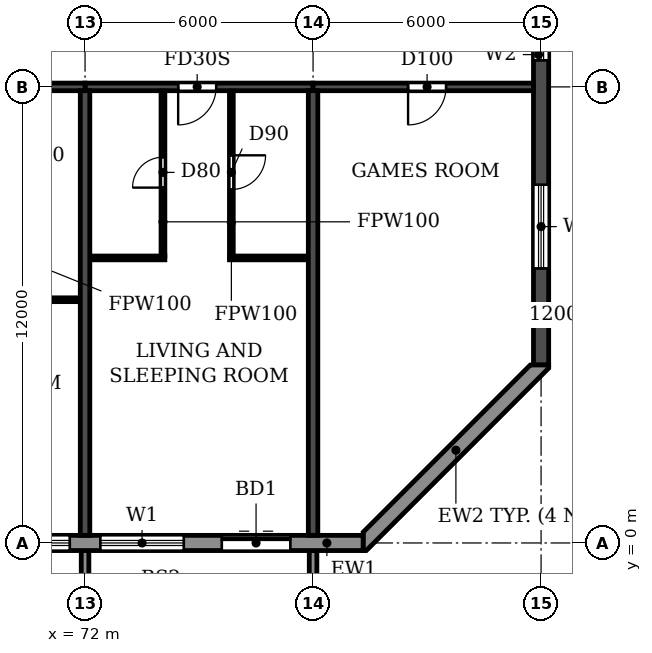
"""IFC4 building model, lengths in metres.
Left out: names, types, materials, properties, quantities, classifications, styles, units other than length and angle.
Written with IfcOpenShell. Run it as: python <this file> out.ifc"""

import sys

from ifc_helpers import new_model, si_unit, direction, frame, frame_2d, origin, place, context, subcontext, project, spatial, polyline, rectangle, outline, extrude, source, transform, mapped, element, fill, save


model = new_model("IFC4")
c1 = context("Model", 3, precision=1e-05, world=origin(), true_north=direction((0.0, 1.0)))
c2 = subcontext(c1, "Body", "Model", "MODEL_VIEW")
j1 = project(units=[si_unit("LENGTHUNIT", "METRE"), si_unit("PLANEANGLEUNIT", "RADIAN")], contexts=[c1])
p1 = place(None, origin())
s1 = spatial("IfcSite", under=j1, at=p1, CompositionType="ELEMENT")
p2 = place(p1, origin())
s2 = spatial("IfcBuilding", under=s1, at=p2, CompositionType="ELEMENT")
p3 = place(p2, frame((0.0, 0.0, 175.2)))
s3 = spatial("IfcBuildingStorey", under=s2, at=p3, CompositionType="ELEMENT", Elevation=175.2)
for number, where, z_axis, x_axis in (
    (1, (72.0, 0.2, 0.0), (0.0, 0.0, 1.0), (0.0, 1.0, 0.0)),
    (2, (78.0, 0.2, 0.0), (0.0, 0.0, 1.0), (0.0, 1.0, 0.0)),
):
    element("IfcWall", number, at=place(p3, frame(where, z_axis=z_axis, x_axis=x_axis)), inside=s3, PredefinedType="SHEAR", context=c2, shape_type="SweptSolid", body=[
        extrude(rectangle(XDim=11.7, YDim=0.25, at=frame_2d((5.85, 0.0))), origin(), (0.0, 0.0, 1.0), 3.08),
    ])
p4 = place(p3, frame((84.0, 4.683, 0.0), z_axis=(0.0, 0.0, 1.0), x_axis=(0.0, 1.0, 0.0)))
e3 = element("IfcWall", 3, at=p4, inside=s3, PredefinedType="SHEAR", context=c2, shape_type="SweptSolid", body=[
    extrude(rectangle(XDim=31.834, YDim=0.4, at=frame_2d((15.917, 0.0))), origin(), (0.0, 0.0, 1.0), 3.08),
])
p5 = place(p4, frame((23.817, 0.0, 0.9)))
e4 = element("IfcOpeningElement", 4, at=p5, cuts=e3, PredefinedType="OPENING", context=c2, shape_type="SweptSolid", body=[
    extrude(rectangle(XDim=1.2, YDim=1.5, at=frame_2d((0.6, 0.75))), frame((0.0, 0.21, 0.0), z_axis=(0.0, -1.0, 0.0), x_axis=(1.0, 0.0, 0.0)), (0.0, 0.0, 1.0), 0.42),
])
p6 = place(p4, frame((8.017, 0.0, 0.9)))
e5 = element("IfcOpeningElement", 5, at=p6, cuts=e3, PredefinedType="OPENING", context=c2, shape_type="SweptSolid", body=[
    extrude(rectangle(XDim=1.2, YDim=1.5, at=frame_2d((0.6, 0.75))), frame((0.0, 0.21, 0.0), z_axis=(0.0, -1.0, 0.0), x_axis=(1.0, 0.0, 0.0)), (0.0, 0.0, 1.0), 0.42),
])
p7 = place(p4, frame((27.694, 0.0, 0.6)))
e6 = element("IfcOpeningElement", 6, at=p7, cuts=e3, PredefinedType="OPENING", context=c2, shape_type="SweptSolid", body=[
    extrude(rectangle(XDim=2.2, YDim=1.8, at=frame_2d((1.1, 0.9))), frame((0.0, 0.21, 0.0), z_axis=(0.0, -1.0, 0.0), x_axis=(1.0, 0.0, 0.0)), (0.0, 0.0, 1.0), 0.42),
])
p8 = place(p4, frame((2.541, 0.0, 0.6)))
e7 = element("IfcOpeningElement", 7, at=p8, cuts=e3, PredefinedType="OPENING", context=c2, shape_type="SweptSolid", body=[
    extrude(rectangle(XDim=2.2, YDim=1.8, at=frame_2d((1.1, 0.9))), frame((0.0, 0.21, 0.0), z_axis=(0.0, -1.0, 0.0), x_axis=(1.0, 0.0, 0.0)), (0.0, 0.0, 1.0), 0.42),
])
p9 = place(p4, frame((15.917, 0.0, 0.9)))
e8 = element("IfcOpeningElement", 8, at=p9, cuts=e3, PredefinedType="OPENING", context=c2, shape_type="SweptSolid", body=[
    extrude(rectangle(XDim=1.2, YDim=1.5, at=frame_2d((0.6, 0.75))), frame((0.0, 0.21, 0.0), z_axis=(0.0, -1.0, 0.0), x_axis=(1.0, 0.0, 0.0)), (0.0, 0.0, 1.0), 0.42),
])
p10 = place(p3, frame((66.0, 12.0, 0.0), z_axis=(0.0, 0.0, 1.0), x_axis=(1.0, 0.0, 0.0)))
e9 = element("IfcWall", 9, at=p10, inside=s3, PredefinedType="SHEAR", context=c2, shape_type="SweptSolid", body=[
    extrude(rectangle(XDim=6.0, YDim=0.2, at=frame_2d((3.0, 0.0))), origin(), (0.0, 0.0, 1.0), 2.48),
])
p11 = place(p10, frame((2.55, 0.0, 0.0)))
e10 = element("IfcOpeningElement", 10, at=p11, cuts=e9, PredefinedType="OPENING", context=c2, shape_type="SweptSolid", body=[
    extrude(rectangle(XDim=1.0, YDim=2.1, at=frame_2d((0.5, 1.05))), frame((0.0, 0.11, 0.0), z_axis=(0.0, -1.0, 0.0), x_axis=(1.0, 0.0, 0.0)), (0.0, 0.0, 1.0), 0.22),
])
p12 = place(p3, frame((72.0, 12.0, 0.0), z_axis=(0.0, 0.0, 1.0), x_axis=(1.0, 0.0, 0.0)))
e11 = element("IfcWall", 11, at=p12, inside=s3, PredefinedType="SHEAR", context=c2, shape_type="SweptSolid", body=[
    extrude(rectangle(XDim=6.0, YDim=0.2, at=frame_2d((3.0, 0.0))), origin(), (0.0, 0.0, 1.0), 2.48),
])
p13 = place(p12, frame((2.45, 0.0, 0.0)))
e12 = element("IfcOpeningElement", 12, at=p13, cuts=e11, PredefinedType="OPENING", context=c2, shape_type="SweptSolid", body=[
    extrude(rectangle(XDim=1.0, YDim=2.1, at=frame_2d((0.5, 1.05))), frame((0.0, 0.11, 0.0), z_axis=(0.0, -1.0, 0.0), x_axis=(1.0, 0.0, 0.0)), (0.0, 0.0, 1.0), 0.22),
])
p14 = place(p3, frame((78.0, 12.0, 0.0), z_axis=(0.0, 0.0, 1.0), x_axis=(1.0, 0.0, 0.0)))
e13 = element("IfcWall", 13, at=p14, inside=s3, PredefinedType="SHEAR", context=c2, shape_type="SweptSolid", body=[
    extrude(rectangle(XDim=5.8, YDim=0.2, at=frame_2d((2.9, 0.0))), origin(), (0.0, 0.0, 1.0), 2.48),
])
p15 = place(p14, frame((2.5, 0.0, 0.0)))
e14 = element("IfcOpeningElement", 14, at=p15, cuts=e13, PredefinedType="OPENING", context=c2, shape_type="SweptSolid", body=[
    extrude(rectangle(XDim=1.0, YDim=2.1, at=frame_2d((0.5, 1.05))), frame((0.0, 0.11, 0.0), z_axis=(0.0, -1.0, 0.0), x_axis=(1.0, 0.0, 0.0)), (0.0, 0.0, 1.0), 0.22),
])
p16 = place(p3, frame((22.683, 0.0, 0.0), z_axis=(0.0, 0.0, 1.0), x_axis=(1.0, 0.0, 0.0)))
e15 = element("IfcWall", 15, at=p16, inside=s3, PredefinedType="STANDARD", context=c2, shape_type="SweptSolid", body=[
    extrude(rectangle(XDim=56.634, YDim=0.4, at=frame_2d((28.317, 0.0))), origin(), (0.0, 0.0, 1.0), 3.08),
])
p17 = place(p16, frame((1.717, 0.0, 0.9)))
e16 = element("IfcOpeningElement", 16, at=p17, cuts=e15, PredefinedType="OPENING", context=c2, shape_type="SweptSolid", body=[
    extrude(rectangle(XDim=2.2, YDim=1.5, at=frame_2d((1.1, 0.75))), frame((0.0, 0.21, 0.0), z_axis=(0.0, -1.0, 0.0), x_axis=(1.0, 0.0, 0.0)), (0.0, 0.0, 1.0), 0.42),
])
p18 = place(p16, frame((4.917, 0.0, 0.0)))
e17 = element("IfcOpeningElement", 17, at=p18, cuts=e15, PredefinedType="OPENING", context=c2, shape_type="SweptSolid", body=[
    extrude(rectangle(XDim=1.8, YDim=2.4, at=frame_2d((0.9, 1.2))), frame((0.0, 0.21, 0.0), z_axis=(0.0, -1.0, 0.0), x_axis=(1.0, 0.0, 0.0)), (0.0, 0.0, 1.0), 0.42),
])
p19 = place(p16, frame((7.717, 0.0, 0.9)))
e18 = element("IfcOpeningElement", 18, at=p19, cuts=e15, PredefinedType="OPENING", context=c2, shape_type="SweptSolid", body=[
    extrude(rectangle(XDim=2.2, YDim=1.5, at=frame_2d((1.1, 0.75))), frame((0.0, 0.21, 0.0), z_axis=(0.0, -1.0, 0.0), x_axis=(1.0, 0.0, 0.0)), (0.0, 0.0, 1.0), 0.42),
])
p20 = place(p16, frame((10.717, 0.0, 0.9)))
e19 = element("IfcOpeningElement", 19, at=p20, cuts=e15, PredefinedType="OPENING", context=c2, shape_type="SweptSolid", body=[
    extrude(rectangle(XDim=2.2, YDim=1.5, at=frame_2d((1.1, 0.75))), frame((0.0, 0.21, 0.0), z_axis=(0.0, -1.0, 0.0), x_axis=(1.0, 0.0, 0.0)), (0.0, 0.0, 1.0), 0.42),
])
p21 = place(p16, frame((13.717, 0.0, 0.9)))
e20 = element("IfcOpeningElement", 20, at=p21, cuts=e15, PredefinedType="OPENING", context=c2, shape_type="SweptSolid", body=[
    extrude(rectangle(XDim=2.2, YDim=1.5, at=frame_2d((1.1, 0.75))), frame((0.0, 0.21, 0.0), z_axis=(0.0, -1.0, 0.0), x_axis=(1.0, 0.0, 0.0)), (0.0, 0.0, 1.0), 0.42),
])
p22 = place(p16, frame((16.917, 0.0, 0.0)))
e21 = element("IfcOpeningElement", 21, at=p22, cuts=e15, PredefinedType="OPENING", context=c2, shape_type="SweptSolid", body=[
    extrude(rectangle(XDim=1.8, YDim=2.4, at=frame_2d((0.9, 1.2))), frame((0.0, 0.21, 0.0), z_axis=(0.0, -1.0, 0.0), x_axis=(1.0, 0.0, 0.0)), (0.0, 0.0, 1.0), 0.42),
])
p23 = place(p16, frame((19.717, 0.0, 0.9)))
e22 = element("IfcOpeningElement", 22, at=p23, cuts=e15, PredefinedType="OPENING", context=c2, shape_type="SweptSolid", body=[
    extrude(rectangle(XDim=2.2, YDim=1.5, at=frame_2d((1.1, 0.75))), frame((0.0, 0.21, 0.0), z_axis=(0.0, -1.0, 0.0), x_axis=(1.0, 0.0, 0.0)), (0.0, 0.0, 1.0), 0.42),
])
p24 = place(p16, frame((22.717, 0.0, 0.9)))
e23 = element("IfcOpeningElement", 23, at=p24, cuts=e15, PredefinedType="OPENING", context=c2, shape_type="SweptSolid", body=[
    extrude(rectangle(XDim=2.2, YDim=1.5, at=frame_2d((1.1, 0.75))), frame((0.0, 0.21, 0.0), z_axis=(0.0, -1.0, 0.0), x_axis=(1.0, 0.0, 0.0)), (0.0, 0.0, 1.0), 0.42),
])
p25 = place(p16, frame((25.917, 0.0, 0.0)))
e24 = element("IfcOpeningElement", 24, at=p25, cuts=e15, PredefinedType="OPENING", context=c2, shape_type="SweptSolid", body=[
    extrude(rectangle(XDim=1.8, YDim=2.4, at=frame_2d((0.9, 1.2))), frame((0.0, 0.21, 0.0), z_axis=(0.0, -1.0, 0.0), x_axis=(1.0, 0.0, 0.0)), (0.0, 0.0, 1.0), 0.42),
])
p26 = place(p16, frame((28.717, 0.0, 0.9)))
e25 = element("IfcOpeningElement", 25, at=p26, cuts=e15, PredefinedType="OPENING", context=c2, shape_type="SweptSolid", body=[
    extrude(rectangle(XDim=2.2, YDim=1.5, at=frame_2d((1.1, 0.75))), frame((0.0, 0.21, 0.0), z_axis=(0.0, -1.0, 0.0), x_axis=(1.0, 0.0, 0.0)), (0.0, 0.0, 1.0), 0.42),
])
p27 = place(p16, frame((31.717, 0.0, 0.9)))
e26 = element("IfcOpeningElement", 26, at=p27, cuts=e15, PredefinedType="OPENING", context=c2, shape_type="SweptSolid", body=[
    extrude(rectangle(XDim=2.2, YDim=1.5, at=frame_2d((1.1, 0.75))), frame((0.0, 0.21, 0.0), z_axis=(0.0, -1.0, 0.0), x_axis=(1.0, 0.0, 0.0)), (0.0, 0.0, 1.0), 0.42),
])
p28 = place(p16, frame((34.717, 0.0, 0.9)))
e27 = element("IfcOpeningElement", 27, at=p28, cuts=e15, PredefinedType="OPENING", context=c2, shape_type="SweptSolid", body=[
    extrude(rectangle(XDim=2.2, YDim=1.5, at=frame_2d((1.1, 0.75))), frame((0.0, 0.21, 0.0), z_axis=(0.0, -1.0, 0.0), x_axis=(1.0, 0.0, 0.0)), (0.0, 0.0, 1.0), 0.42),
])
p29 = place(p16, frame((37.717, 0.0, 0.9)))
e28 = element("IfcOpeningElement", 28, at=p29, cuts=e15, PredefinedType="OPENING", context=c2, shape_type="SweptSolid", body=[
    extrude(rectangle(XDim=2.2, YDim=1.5, at=frame_2d((1.1, 0.75))), frame((0.0, 0.21, 0.0), z_axis=(0.0, -1.0, 0.0), x_axis=(1.0, 0.0, 0.0)), (0.0, 0.0, 1.0), 0.42),
])
p30 = place(p16, frame((40.917, 0.0, 0.0)))
e29 = element("IfcOpeningElement", 29, at=p30, cuts=e15, PredefinedType="OPENING", context=c2, shape_type="SweptSolid", body=[
    extrude(rectangle(XDim=1.8, YDim=2.4, at=frame_2d((0.9, 1.2))), frame((0.0, 0.21, 0.0), z_axis=(0.0, -1.0, 0.0), x_axis=(1.0, 0.0, 0.0)), (0.0, 0.0, 1.0), 0.42),
])
p31 = place(p16, frame((43.717, 0.0, 0.9)))
e30 = element("IfcOpeningElement", 30, at=p31, cuts=e15, PredefinedType="OPENING", context=c2, shape_type="SweptSolid", body=[
    extrude(rectangle(XDim=2.2, YDim=1.5, at=frame_2d((1.1, 0.75))), frame((0.0, 0.21, 0.0), z_axis=(0.0, -1.0, 0.0), x_axis=(1.0, 0.0, 0.0)), (0.0, 0.0, 1.0), 0.42),
])
p32 = place(p16, frame((46.717, 0.0, 0.9)))
e31 = element("IfcOpeningElement", 31, at=p32, cuts=e15, PredefinedType="OPENING", context=c2, shape_type="SweptSolid", body=[
    extrude(rectangle(XDim=2.2, YDim=1.5, at=frame_2d((1.1, 0.75))), frame((0.0, 0.21, 0.0), z_axis=(0.0, -1.0, 0.0), x_axis=(1.0, 0.0, 0.0)), (0.0, 0.0, 1.0), 0.42),
])
p33 = place(p16, frame((49.717, 0.0, 0.9)))
e32 = element("IfcOpeningElement", 32, at=p33, cuts=e15, PredefinedType="OPENING", context=c2, shape_type="SweptSolid", body=[
    extrude(rectangle(XDim=2.2, YDim=1.5, at=frame_2d((1.1, 0.75))), frame((0.0, 0.21, 0.0), z_axis=(0.0, -1.0, 0.0), x_axis=(1.0, 0.0, 0.0)), (0.0, 0.0, 1.0), 0.42),
])
p34 = place(p16, frame((52.917, 0.0, 0.0)))
e33 = element("IfcOpeningElement", 33, at=p34, cuts=e15, PredefinedType="OPENING", context=c2, shape_type="SweptSolid", body=[
    extrude(rectangle(XDim=1.8, YDim=2.4, at=frame_2d((0.9, 1.2))), frame((0.0, 0.21, 0.0), z_axis=(0.0, -1.0, 0.0), x_axis=(1.0, 0.0, 0.0)), (0.0, 0.0, 1.0), 0.42),
])
p35 = place(p3, origin())
e34 = element("IfcWall", 34, at=p35, inside=s3, PredefinedType="STANDARD", context=c2, shape_type="SweptSolid", body=[
    extrude(outline(polyline([(79.317, -0.2), (79.4, -0.2), (84.2, 4.6), (84.2, 4.683), (83.717, 4.683), (79.317, 0.283), (79.317, -0.2)])), origin(), (0.0, 0.0, 1.0), 3.08),
])
m1 = source(origin(), c2, "Body", "SweptSolid", [
    extrude(outline(polyline([(0.0, 0.0), (0.2, 0.0), (0.2, 1.65), (0.0, 1.65), (0.0, 0.0)])), origin(), (0.0, 0.0, 1.0), 3.1),
])
for number, where in (
    (35, (71.9, -1.85, 0.0)),
    (36, (77.9, -1.85, 0.0)),
):
    element("IfcWall", number, at=place(p3, frame(where)), inside=s3, PredefinedType="STANDARD", context=c2, shape_type="MappedRepresentation", body=[
        mapped(m1, transform((0.0, 0.0, 0.0))),
    ])
for number, where, z_axis, x_axis in (
    (37, (69.9, 6.4, 0.0), (0.0, 0.0, 1.0), (1.0, 0.0, 0.0)),
    (38, (72.135, 7.5, 0.0), (0.0, 0.0, 1.0), (1.0, 0.0, 0.0)),
):
    element("IfcWall", number, at=place(p3, frame(where, z_axis=z_axis, x_axis=x_axis)), inside=s3, PredefinedType="PARTITIONING", context=c2, shape_type="SweptSolid", body=[
        extrude(rectangle(XDim=1.965, YDim=0.1, at=frame_2d((0.982, 0.0))), origin(), (0.0, 0.0, 1.0), 3.08),
    ])
p36 = place(p3, frame((75.8, 7.5, 0.0), z_axis=(0.0, 0.0, 1.0), x_axis=(1.0, 0.0, 0.0)))
e39 = element("IfcWall", 39, at=p36, inside=s3, PredefinedType="PARTITIONING", context=c2, shape_type="SweptSolid", body=[
    extrude(rectangle(XDim=2.065, YDim=0.1, at=frame_2d((1.032, 0.0))), origin(), (0.0, 0.0, 1.0), 3.08),
])
p37 = place(p3, frame((74.05, 7.55, 0.0), z_axis=(0.0, 0.0, 1.0), x_axis=(0.0, 1.0, 0.0)))
e40 = element("IfcWall", 40, at=p37, inside=s3, PredefinedType="PARTITIONING", context=c2, shape_type="SweptSolid", body=[
    extrude(rectangle(XDim=4.34, YDim=0.1, at=frame_2d((2.17, 0.0))), origin(), (0.0, 0.0, 1.0), 3.08),
])
p38 = place(p37, frame((1.8, 0.0, 0.0)))
e41 = element("IfcOpeningElement", 41, at=p38, cuts=e40, PredefinedType="OPENING", context=c2, shape_type="SweptSolid", body=[
    extrude(rectangle(XDim=0.8, YDim=2.1, at=frame_2d((0.4, 1.05))), frame((0.0, 0.06, 0.0), z_axis=(0.0, -1.0, 0.0), x_axis=(1.0, 0.0, 0.0)), (0.0, 0.0, 1.0), 0.12),
])
p39 = place(p3, frame((75.85, 7.55, 0.0), z_axis=(0.0, 0.0, 1.0), x_axis=(0.0, 1.0, 0.0)))
e42 = element("IfcWall", 42, at=p39, inside=s3, PredefinedType="PARTITIONING", context=c2, shape_type="SweptSolid", body=[
    extrude(rectangle(XDim=4.34, YDim=0.1, at=frame_2d((2.17, 0.0))), origin(), (0.0, 0.0, 1.0), 3.08),
])
p40 = place(p39, frame((1.75, 0.0, 0.0)))
e43 = element("IfcOpeningElement", 43, at=p40, cuts=e42, PredefinedType="OPENING", context=c2, shape_type="SweptSolid", body=[
    extrude(rectangle(XDim=0.9, YDim=2.1, at=frame_2d((0.45, 1.05))), frame((0.0, 0.06, 0.0), z_axis=(0.0, -1.0, 0.0), x_axis=(1.0, 0.0, 0.0)), (0.0, 0.0, 1.0), 0.12),
])
p41 = place(p32, origin())
e44 = element("IfcWindow", 44, at=p41, inside=s3, PartitioningType="DOUBLE_PANEL_HORIZONTAL", PredefinedType="WINDOW", context=c2, shape_type="SweptSolid", body=[
    extrude(rectangle(XDim=2.2, YDim=1.5, at=frame_2d((1.1, 0.75))), frame((0.0, 0.03, 0.0), z_axis=(0.0, -1.0, 0.0), x_axis=(1.0, 0.0, 0.0)), (0.0, 0.0, 1.0), 0.06),
])
fill(e31, e44)
p42 = place(p33, origin())
e45 = element("IfcWindow", 45, at=p42, inside=s3, PartitioningType="DOUBLE_PANEL_HORIZONTAL", PredefinedType="WINDOW", context=c2, shape_type="SweptSolid", body=[
    extrude(rectangle(XDim=2.2, YDim=1.5, at=frame_2d((1.1, 0.75))), frame((0.0, 0.03, 0.0), z_axis=(0.0, -1.0, 0.0), x_axis=(1.0, 0.0, 0.0)), (0.0, 0.0, 1.0), 0.06),
])
fill(e32, e45)
p43 = place(p34, origin())
e46 = element("IfcDoor", 46, at=p43, inside=s3, OperationType="DOUBLE_DOOR_SLIDING", PredefinedType="DOOR", context=c2, shape_type="SweptSolid", body=[
    extrude(rectangle(XDim=1.8, YDim=2.4, at=frame_2d((0.9, 1.2))), frame((0.0, 0.025, 0.0), z_axis=(0.0, -1.0, 0.0), x_axis=(1.0, 0.0, 0.0)), (0.0, 0.0, 1.0), 0.05),
])
fill(e33, e46)
p44 = place(p6, origin())
e47 = element("IfcWindow", 47, at=p44, inside=s3, PartitioningType="SINGLE_PANEL", PredefinedType="WINDOW", context=c2, shape_type="SweptSolid", body=[
    extrude(rectangle(XDim=1.2, YDim=1.5, at=frame_2d((0.6, 0.75))), frame((0.0, 0.03, 0.0), z_axis=(0.0, -1.0, 0.0), x_axis=(1.0, 0.0, 0.0)), (0.0, 0.0, 1.0), 0.06),
])
fill(e5, e47)
p45 = place(p8, origin())
e48 = element("IfcWindow", 48, at=p45, inside=s3, PartitioningType="DOUBLE_PANEL_HORIZONTAL", PredefinedType="WINDOW", context=c2, shape_type="SweptSolid", body=[
    extrude(rectangle(XDim=2.2, YDim=1.8, at=frame_2d((1.1, 0.9))), frame((0.0, 0.03, 0.0), z_axis=(0.0, -1.0, 0.0), x_axis=(1.0, 0.0, 0.0)), (0.0, 0.0, 1.0), 0.06),
])
fill(e7, e48)
p46 = place(p38, origin())
e49 = element("IfcDoor", 49, at=p46, inside=s3, OperationType="SINGLE_SWING_LEFT", PredefinedType="DOOR", context=c2, shape_type="SweptSolid", body=[
    extrude(rectangle(XDim=0.8, YDim=2.1, at=frame_2d((0.4, 1.05))), frame((0.0, 0.025, 0.0), z_axis=(0.0, -1.0, 0.0), x_axis=(1.0, 0.0, 0.0)), (0.0, 0.0, 1.0), 0.05),
])
fill(e41, e49)
p47 = place(p13, frame((1.0, 0.0, 0.0), z_axis=(0.0, 0.0, 1.0), x_axis=(-1.0, 0.0, 0.0)))
e50 = element("IfcDoor", 50, at=p47, inside=s3, OperationType="SINGLE_SWING_RIGHT", PredefinedType="DOOR", context=c2, shape_type="SweptSolid", body=[
    extrude(rectangle(XDim=1.0, YDim=2.1, at=frame_2d((0.5, 1.05))), frame((0.0, 0.025, 0.0), z_axis=(0.0, -1.0, 0.0), x_axis=(1.0, 0.0, 0.0)), (0.0, 0.0, 1.0), 0.05),
])
fill(e12, e50)
p48 = place(p40, frame((0.9, 0.0, 0.0), z_axis=(0.0, 0.0, 1.0), x_axis=(-1.0, 0.0, 0.0)))
e51 = element("IfcDoor", 51, at=p48, inside=s3, OperationType="SINGLE_SWING_LEFT", PredefinedType="DOOR", context=c2, shape_type="SweptSolid", body=[
    extrude(rectangle(XDim=0.9, YDim=2.1, at=frame_2d((0.45, 1.05))), frame((0.0, 0.025, 0.0), z_axis=(0.0, -1.0, 0.0), x_axis=(1.0, 0.0, 0.0)), (0.0, 0.0, 1.0), 0.05),
])
fill(e43, e51)
p49 = place(p15, frame((1.0, 0.0, 0.0), z_axis=(0.0, 0.0, 1.0), x_axis=(-1.0, 0.0, 0.0)))
e52 = element("IfcDoor", 52, at=p49, inside=s3, OperationType="SINGLE_SWING_RIGHT", PredefinedType="DOOR", context=c2, shape_type="SweptSolid", body=[
    extrude(rectangle(XDim=1.0, YDim=2.1, at=frame_2d((0.5, 1.05))), frame((0.0, 0.025, 0.0), z_axis=(0.0, -1.0, 0.0), x_axis=(1.0, 0.0, 0.0)), (0.0, 0.0, 1.0), 0.05),
])
fill(e14, e52)
save(model, sys.argv[1])
